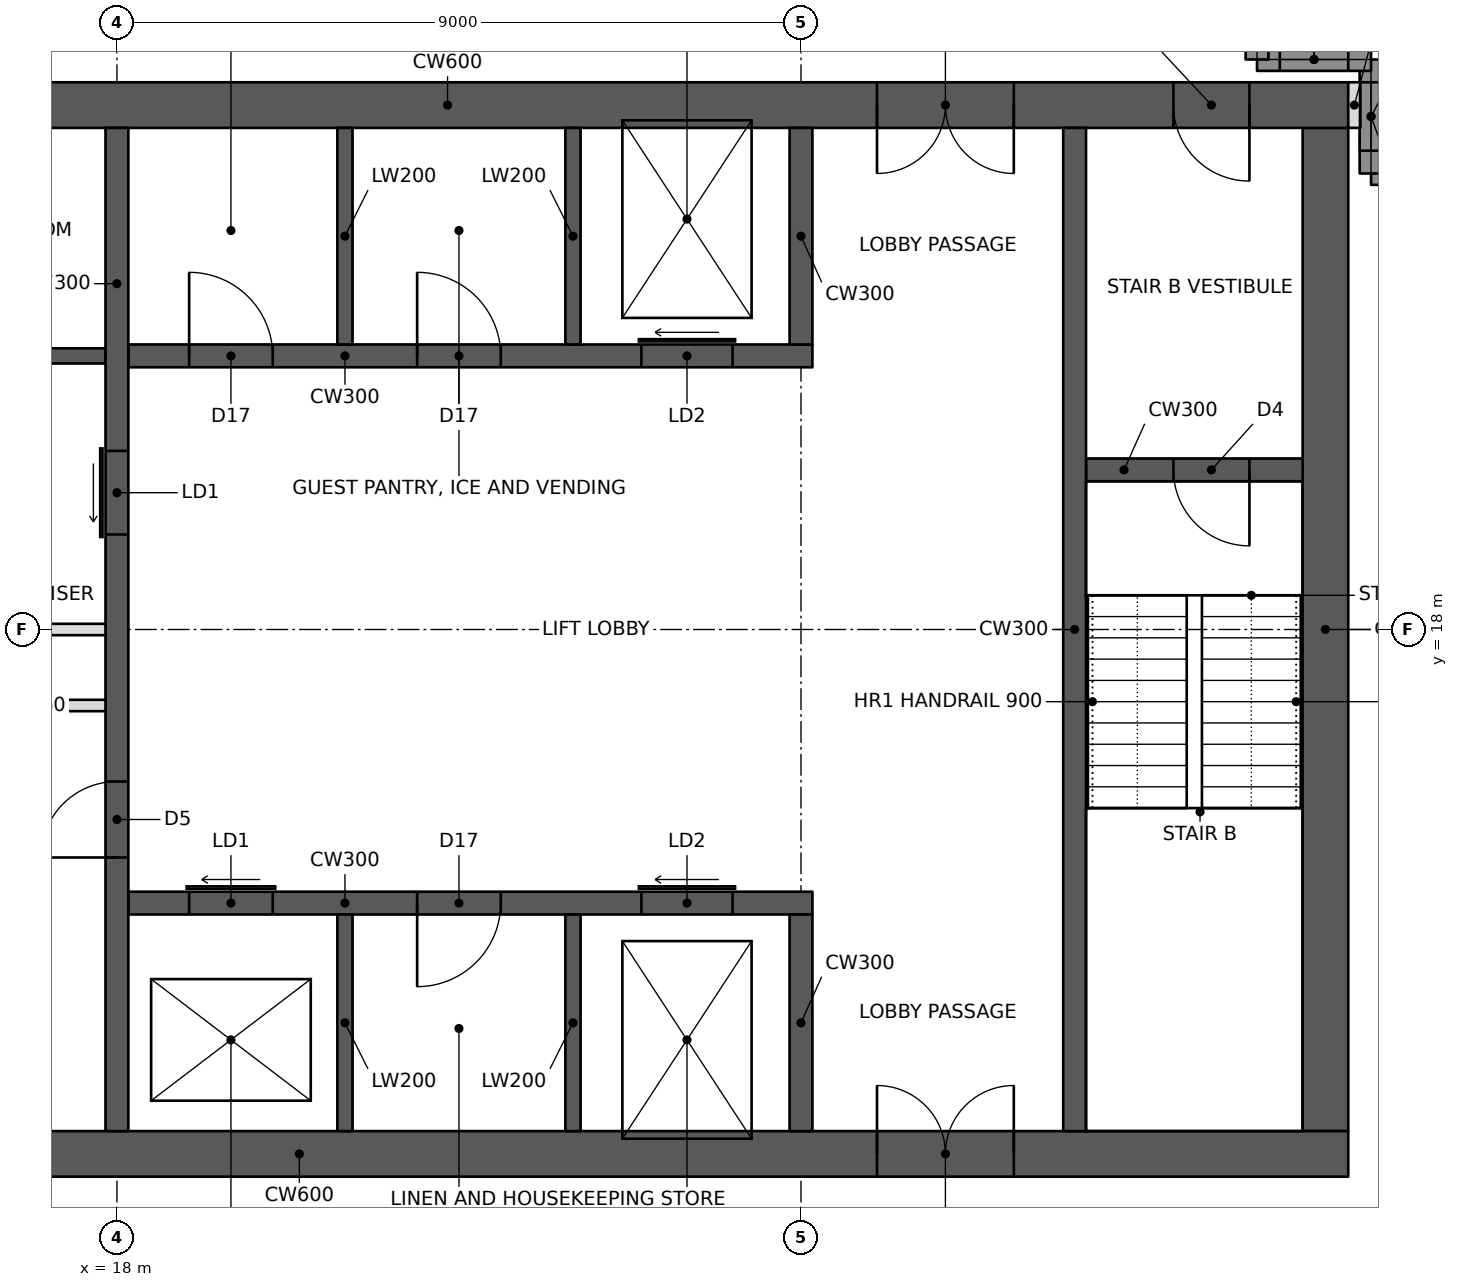
"""IFC4 building model, lengths in metres.
Left out: names, types, materials, properties, quantities, classifications, styles, units other than length and angle.
Written with IfcOpenShell. Run it as: python <this file> out.ifc"""

import sys

from ifc_helpers import new_model, si_unit, direction, frame, frame_2d, origin, place, context, subcontext, project, spatial, rectangle, extrude, element, fill, save


model = new_model("IFC4")
c1 = context("Model", 3, precision=1e-05, world=origin(), true_north=direction((0.0, 1.0)))
c2 = subcontext(c1, "Body", "Model", "MODEL_VIEW")
j1 = project(units=[si_unit("LENGTHUNIT", "METRE"), si_unit("PLANEANGLEUNIT", "RADIAN")], contexts=[c1])
p1 = place(None, origin())
s1 = spatial("IfcSite", under=j1, at=p1, CompositionType="ELEMENT")
p2 = place(p1, origin())
s2 = spatial("IfcBuilding", under=s1, at=p2, CompositionType="ELEMENT")
p3 = place(p2, frame((0.0, 0.0, 251.8)))
s3 = spatial("IfcBuildingStorey", under=s2, at=p3, CompositionType="ELEMENT", Elevation=251.8)
p4 = place(p3, frame((10.8, 11.1, 0.0), z_axis=(0.0, 0.0, 1.0), x_axis=(1.0, 0.0, 0.0)))
e1 = element("IfcWall", 1, at=p4, inside=s3, PredefinedType="SHEAR", context=c2, shape_type="SweptSolid", body=[
    extrude(rectangle(XDim=23.4, YDim=0.6, at=frame_2d((11.7, 0.0))), origin(), (0.0, 0.0, 1.0), 3.6),
])
p5 = place(p4, frame((1.0, 0.0, 0.0)))
e2 = element("IfcOpeningElement", 2, at=p5, cuts=e1, PredefinedType="OPENING", context=c2, shape_type="SweptSolid", body=[
    extrude(rectangle(XDim=1.0, YDim=2.1, at=frame_2d((0.5, 1.05))), frame((0.0, 0.31, 0.0), z_axis=(0.0, -1.0, 0.0), x_axis=(1.0, 0.0, 0.0)), (0.0, 0.0, 1.0), 0.62),
])
p6 = place(p4, frame((17.2, 0.0, 0.0)))
e3 = element("IfcOpeningElement", 3, at=p6, cuts=e1, PredefinedType="OPENING", context=c2, shape_type="SweptSolid", body=[
    extrude(rectangle(XDim=1.8, YDim=2.1, at=frame_2d((0.9, 1.05))), frame((0.0, 0.31, 0.0), z_axis=(0.0, -1.0, 0.0), x_axis=(1.0, 0.0, 0.0)), (0.0, 0.0, 1.0), 0.62),
])
p7 = place(p3, frame((10.8, 24.9, 0.0), z_axis=(0.0, 0.0, 1.0), x_axis=(1.0, 0.0, 0.0)))
e4 = element("IfcWall", 4, at=p7, inside=s3, PredefinedType="SHEAR", context=c2, shape_type="SweptSolid", body=[
    extrude(rectangle(XDim=23.4, YDim=0.6, at=frame_2d((11.7, 0.0))), origin(), (0.0, 0.0, 1.0), 3.6),
])
p8 = place(p7, frame((17.2, 0.0, 0.0)))
e5 = element("IfcOpeningElement", 5, at=p8, cuts=e4, PredefinedType="OPENING", context=c2, shape_type="SweptSolid", body=[
    extrude(rectangle(XDim=1.8, YDim=2.1, at=frame_2d((0.9, 1.05))), frame((0.0, 0.31, 0.0), z_axis=(0.0, -1.0, 0.0), x_axis=(1.0, 0.0, 0.0)), (0.0, 0.0, 1.0), 0.62),
])
p9 = place(p7, frame((21.1, 0.0, 0.0)))
e6 = element("IfcOpeningElement", 6, at=p9, cuts=e4, PredefinedType="OPENING", context=c2, shape_type="SweptSolid", body=[
    extrude(rectangle(XDim=1.0, YDim=2.1, at=frame_2d((0.5, 1.05))), frame((0.0, 0.31, 0.0), z_axis=(0.0, -1.0, 0.0), x_axis=(1.0, 0.0, 0.0)), (0.0, 0.0, 1.0), 0.62),
])
p10 = place(p7, frame((4.9, 0.0, 0.0)))
e7 = element("IfcOpeningElement", 7, at=p10, cuts=e4, PredefinedType="OPENING", context=c2, shape_type="SweptSolid", body=[
    extrude(rectangle(XDim=1.0, YDim=2.1, at=frame_2d((0.5, 1.05))), frame((0.0, 0.31, 0.0), z_axis=(0.0, -1.0, 0.0), x_axis=(1.0, 0.0, 0.0)), (0.0, 0.0, 1.0), 0.62),
])
p11 = place(p3, frame((33.9, 11.4, 0.0), z_axis=(0.0, 0.0, 1.0), x_axis=(0.0, 1.0, 0.0)))
e8 = element("IfcWall", 8, at=p11, inside=s3, PredefinedType="SHEAR", context=c2, shape_type="SweptSolid", body=[
    extrude(rectangle(XDim=13.2, YDim=0.6, at=frame_2d((6.6, 0.0))), origin(), (0.0, 0.0, 1.0), 3.6),
])
p12 = place(p3, frame((18.0, 11.4, 0.0), z_axis=(0.0, 0.0, 1.0), x_axis=(0.0, 1.0, 0.0)))
e9 = element("IfcWall", 9, at=p12, inside=s3, PredefinedType="SHEAR", context=c2, shape_type="SweptSolid", body=[
    extrude(rectangle(XDim=13.2, YDim=0.3, at=frame_2d((6.6, 0.0))), origin(), (0.0, 0.0, 1.0), 3.6),
])
p13 = place(p12, frame((3.6, 0.0, 0.0)))
e10 = element("IfcOpeningElement", 10, at=p13, cuts=e9, PredefinedType="OPENING", context=c2, shape_type="SweptSolid", body=[
    extrude(rectangle(XDim=1.0, YDim=2.1, at=frame_2d((0.5, 1.05))), frame((0.0, 0.16, 0.0), z_axis=(0.0, -1.0, 0.0), x_axis=(1.0, 0.0, 0.0)), (0.0, 0.0, 1.0), 0.32),
])
p14 = place(p12, frame((7.85, 0.0, 0.0)))
e11 = element("IfcOpeningElement", 11, at=p14, cuts=e9, PredefinedType="OPENING", context=c2, shape_type="SweptSolid", body=[
    extrude(rectangle(XDim=1.1, YDim=2.1, at=frame_2d((0.55, 1.05))), frame((0.0, 0.16, 0.0), z_axis=(0.0, -1.0, 0.0), x_axis=(1.0, 0.0, 0.0)), (0.0, 0.0, 1.0), 0.32),
])
p15 = place(p3, frame((14.55, 18.0, 0.0), z_axis=(0.0, 0.0, 1.0), x_axis=(1.0, 0.0, 0.0)))
e12 = element("IfcWall", 12, at=p15, inside=s3, PredefinedType="PARTITIONING", context=c2, shape_type="SweptSolid", body=[
    extrude(rectangle(XDim=3.3, YDim=0.15, at=frame_2d((1.65, 0.0))), origin(), (0.0, 0.0, 1.0), 3.4),
])
p16 = place(p3, frame((18.15, 14.4, 0.0), z_axis=(0.0, 0.0, 1.0), x_axis=(1.0, 0.0, 0.0)))
e13 = element("IfcWall", 13, at=p16, inside=s3, PredefinedType="SHEAR", context=c2, shape_type="SweptSolid", body=[
    extrude(rectangle(XDim=9.0, YDim=0.3, at=frame_2d((4.5, 0.0))), origin(), (0.0, 0.0, 1.0), 3.6),
])
p17 = place(p16, frame((0.8, 0.0, 0.0)))
e14 = element("IfcOpeningElement", 14, at=p17, cuts=e13, PredefinedType="OPENING", context=c2, shape_type="SweptSolid", body=[
    extrude(rectangle(XDim=1.1, YDim=2.1, at=frame_2d((0.55, 1.05))), frame((0.0, 0.16, 0.0), z_axis=(0.0, -1.0, 0.0), x_axis=(1.0, 0.0, 0.0)), (0.0, 0.0, 1.0), 0.32),
])
p18 = place(p16, frame((6.75, 0.0, 0.0)))
e15 = element("IfcOpeningElement", 15, at=p18, cuts=e13, PredefinedType="OPENING", context=c2, shape_type="SweptSolid", body=[
    extrude(rectangle(XDim=1.2, YDim=2.1, at=frame_2d((0.6, 1.05))), frame((0.0, 0.16, 0.0), z_axis=(0.0, -1.0, 0.0), x_axis=(1.0, 0.0, 0.0)), (0.0, 0.0, 1.0), 0.32),
])
p19 = place(p16, frame((3.8, 0.0, 0.0)))
e16 = element("IfcOpeningElement", 16, at=p19, cuts=e13, PredefinedType="OPENING", context=c2, shape_type="SweptSolid", body=[
    extrude(rectangle(XDim=1.1, YDim=2.1, at=frame_2d((0.55, 1.05))), frame((0.0, 0.16, 0.0), z_axis=(0.0, -1.0, 0.0), x_axis=(1.0, 0.0, 0.0)), (0.0, 0.0, 1.0), 0.32),
])
p20 = place(p3, frame((27.0, 11.4, 0.0), z_axis=(0.0, 0.0, 1.0), x_axis=(0.0, 1.0, 0.0)))
e17 = element("IfcWall", 17, at=p20, inside=s3, PredefinedType="SHEAR", context=c2, shape_type="SweptSolid", body=[
    extrude(rectangle(XDim=2.85, YDim=0.3, at=frame_2d((1.425, 0.0))), origin(), (0.0, 0.0, 1.0), 3.6),
])
for number, where, z_axis, x_axis in (
    (18, (21.0, 11.4, 0.0), (0.0, 0.0, 1.0), (0.0, 1.0, 0.0)),
    (19, (24.0, 11.4, 0.0), (0.0, 0.0, 1.0), (0.0, 1.0, 0.0)),
):
    element("IfcWall", number, at=place(p3, frame(where, z_axis=z_axis, x_axis=x_axis)), inside=s3, PredefinedType="SHEAR", context=c2, shape_type="SweptSolid", body=[
        extrude(rectangle(XDim=2.85, YDim=0.2, at=frame_2d((1.425, 0.0))), origin(), (0.0, 0.0, 1.0), 3.6),
    ])
p21 = place(p3, frame((18.15, 21.6, 0.0), z_axis=(0.0, 0.0, 1.0), x_axis=(1.0, 0.0, 0.0)))
e20 = element("IfcWall", 20, at=p21, inside=s3, PredefinedType="SHEAR", context=c2, shape_type="SweptSolid", body=[
    extrude(rectangle(XDim=9.0, YDim=0.3, at=frame_2d((4.5, 0.0))), origin(), (0.0, 0.0, 1.0), 3.6),
])
p22 = place(p21, frame((6.75, 0.0, 0.0)))
e21 = element("IfcOpeningElement", 21, at=p22, cuts=e20, PredefinedType="OPENING", context=c2, shape_type="SweptSolid", body=[
    extrude(rectangle(XDim=1.2, YDim=2.1, at=frame_2d((0.6, 1.05))), frame((0.0, 0.16, 0.0), z_axis=(0.0, -1.0, 0.0), x_axis=(1.0, 0.0, 0.0)), (0.0, 0.0, 1.0), 0.32),
])
p23 = place(p21, frame((0.8, 0.0, 0.0)))
e22 = element("IfcOpeningElement", 22, at=p23, cuts=e20, PredefinedType="OPENING", context=c2, shape_type="SweptSolid", body=[
    extrude(rectangle(XDim=1.1, YDim=2.1, at=frame_2d((0.55, 1.05))), frame((0.0, 0.16, 0.0), z_axis=(0.0, -1.0, 0.0), x_axis=(1.0, 0.0, 0.0)), (0.0, 0.0, 1.0), 0.32),
])
p24 = place(p21, frame((3.8, 0.0, 0.0)))
e23 = element("IfcOpeningElement", 23, at=p24, cuts=e20, PredefinedType="OPENING", context=c2, shape_type="SweptSolid", body=[
    extrude(rectangle(XDim=1.1, YDim=2.1, at=frame_2d((0.55, 1.05))), frame((0.0, 0.16, 0.0), z_axis=(0.0, -1.0, 0.0), x_axis=(1.0, 0.0, 0.0)), (0.0, 0.0, 1.0), 0.32),
])
p25 = place(p3, frame((27.0, 21.75, 0.0), z_axis=(0.0, 0.0, 1.0), x_axis=(0.0, 1.0, 0.0)))
e24 = element("IfcWall", 24, at=p25, inside=s3, PredefinedType="SHEAR", context=c2, shape_type="SweptSolid", body=[
    extrude(rectangle(XDim=2.85, YDim=0.3, at=frame_2d((1.425, 0.0))), origin(), (0.0, 0.0, 1.0), 3.6),
])
for number, where, z_axis, x_axis in (
    (25, (21.0, 21.75, 0.0), (0.0, 0.0, 1.0), (0.0, 1.0, 0.0)),
    (26, (24.0, 21.75, 0.0), (0.0, 0.0, 1.0), (0.0, 1.0, 0.0)),
):
    element("IfcWall", number, at=place(p3, frame(where, z_axis=z_axis, x_axis=x_axis)), inside=s3, PredefinedType="SHEAR", context=c2, shape_type="SweptSolid", body=[
        extrude(rectangle(XDim=2.85, YDim=0.2, at=frame_2d((1.425, 0.0))), origin(), (0.0, 0.0, 1.0), 3.6),
    ])
p26 = place(p3, frame((30.6, 11.4, 0.0), z_axis=(0.0, 0.0, 1.0), x_axis=(0.0, 1.0, 0.0)))
e27 = element("IfcWall", 27, at=p26, inside=s3, PredefinedType="SHEAR", context=c2, shape_type="SweptSolid", body=[
    extrude(rectangle(XDim=13.2, YDim=0.3, at=frame_2d((6.6, 0.0))), origin(), (0.0, 0.0, 1.0), 3.6),
])
p27 = place(p3, frame((30.75, 20.1, 0.0), z_axis=(0.0, 0.0, 1.0), x_axis=(1.0, 0.0, 0.0)))
e28 = element("IfcWall", 28, at=p27, inside=s3, PredefinedType="SHEAR", context=c2, shape_type="SweptSolid", body=[
    extrude(rectangle(XDim=2.85, YDim=0.3, at=frame_2d((1.425, 0.0))), origin(), (0.0, 0.0, 1.0), 3.6),
])
p28 = place(p27, frame((1.15, 0.0, 0.0)))
e29 = element("IfcOpeningElement", 29, at=p28, cuts=e28, PredefinedType="OPENING", context=c2, shape_type="SweptSolid", body=[
    extrude(rectangle(XDim=1.0, YDim=2.1, at=frame_2d((0.5, 1.05))), frame((0.0, 0.16, 0.0), z_axis=(0.0, -1.0, 0.0), x_axis=(1.0, 0.0, 0.0)), (0.0, 0.0, 1.0), 0.32),
])
p29 = place(p3, frame((14.55, 21.6, 0.0), z_axis=(0.0, 0.0, 1.0), x_axis=(1.0, 0.0, 0.0)))
e30 = element("IfcWall", 30, at=p29, inside=s3, PredefinedType="SHEAR", context=c2, shape_type="SweptSolid", body=[
    extrude(rectangle(XDim=3.3, YDim=0.2, at=frame_2d((1.65, 0.0))), origin(), (0.0, 0.0, 1.0), 3.6),
])
p30 = place(p3, frame((36.0, 24.0, 0.0), z_axis=(0.0, 0.0, 1.0), x_axis=(-1.0, 0.0, 0.0)))
e31 = element("IfcWall", 31, at=p30, inside=s3, PredefinedType="SOLIDWALL", context=c2, shape_type="SweptSolid", body=[
    extrude(rectangle(XDim=1.5, YDim=0.3, at=frame_2d((0.75, 0.0))), origin(), (0.0, 0.0, 1.0), 2.62),
])
p31 = place(p3, frame((34.5, 24.0, 0.0), z_axis=(0.0, 0.0, 1.0), x_axis=(0.0, 1.0, 0.0)))
e32 = element("IfcWall", 32, at=p31, inside=s3, PredefinedType="SOLIDWALL", context=c2, shape_type="SweptSolid", body=[
    extrude(rectangle(XDim=1.5, YDim=0.3, at=frame_2d((0.75, 0.0))), origin(), (0.0, 0.0, 1.0), 3.4),
])
p32 = place(p31, frame((0.3, 0.0, 0.6)))
e33 = element("IfcOpeningElement", 33, at=p32, cuts=e32, PredefinedType="OPENING", context=c2, shape_type="SweptSolid", body=[
    extrude(rectangle(XDim=0.9, YDim=2.2, at=frame_2d((0.45, 1.1))), frame((0.0, 0.16, 0.0), z_axis=(0.0, -1.0, 0.0), x_axis=(1.0, 0.0, 0.0)), (0.0, 0.0, 1.0), 0.32),
])
p33 = place(p3, frame((34.5, 25.5, 0.0), z_axis=(0.0, 0.0, 1.0), x_axis=(-1.0, 0.0, 0.0)))
e34 = element("IfcWall", 34, at=p33, inside=s3, PredefinedType="SOLIDWALL", context=c2, shape_type="SweptSolid", body=[
    extrude(rectangle(XDim=1.5, YDim=0.3, at=frame_2d((0.75, 0.0))), origin(), (0.0, 0.0, 1.0), 3.4),
])
p34 = place(p33, frame((0.3, 0.0, 0.6)))
e35 = element("IfcOpeningElement", 35, at=p34, cuts=e34, PredefinedType="OPENING", context=c2, shape_type="SweptSolid", body=[
    extrude(rectangle(XDim=0.9, YDim=2.2, at=frame_2d((0.45, 1.1))), frame((0.0, 0.16, 0.0), z_axis=(0.0, -1.0, 0.0), x_axis=(1.0, 0.0, 0.0)), (0.0, 0.0, 1.0), 0.32),
])
p35 = place(p3, frame((33.0, 25.5, 0.0), z_axis=(0.0, 0.0, 1.0), x_axis=(0.0, 1.0, 0.0)))
e36 = element("IfcWall", 36, at=p35, inside=s3, PredefinedType="SOLIDWALL", context=c2, shape_type="SweptSolid", body=[
    extrude(rectangle(XDim=1.5, YDim=0.3, at=frame_2d((0.75, 0.0))), origin(), (0.0, 0.0, 1.0), 2.62),
])
p36 = place(p3, frame((34.2, 24.9, 0.0), z_axis=(0.0, 0.0, 1.0), x_axis=(1.0, 0.0, 0.0)))
e37 = element("IfcWall", 37, at=p36, inside=s3, PredefinedType="PARTITIONING", context=c2, shape_type="SweptSolid", body=[
    extrude(rectangle(XDim=0.16, YDim=0.6, at=frame_2d((0.08, 0.0))), origin(), (0.0, 0.0, 1.0), 3.4),
])
p37 = place(p3, frame((14.55, 17.0, 0.0), z_axis=(0.0, 0.0, 1.0), x_axis=(1.0, 0.0, 0.0)))
e38 = element("IfcWall", 38, at=p37, inside=s3, PredefinedType="PARTITIONING", context=c2, shape_type="SweptSolid", body=[
    extrude(rectangle(XDim=3.3, YDim=0.15, at=frame_2d((1.65, 0.0))), origin(), (0.0, 0.0, 1.0), 3.4),
])
p38 = place(p37, frame((0.3, 0.0, 0.0)))
e39 = element("IfcOpeningElement", 39, at=p38, cuts=e38, PredefinedType="OPENING", context=c2, shape_type="SweptSolid", body=[
    extrude(rectangle(XDim=1.0, YDim=2.1, at=frame_2d((0.5, 1.05))), frame((0.0, 0.085, 0.0), z_axis=(0.0, -1.0, 0.0), x_axis=(1.0, 0.0, 0.0)), (0.0, 0.0, 1.0), 0.17),
])
p39 = place(p32, origin())
e40 = element("IfcWindow", 40, at=p39, inside=s3, PartitioningType="SINGLE_PANEL", PredefinedType="WINDOW", context=c2, shape_type="SweptSolid", body=[
    extrude(rectangle(XDim=0.9, YDim=2.2, at=frame_2d((0.45, 1.1))), frame((0.0, 0.03, 0.0), z_axis=(0.0, -1.0, 0.0), x_axis=(1.0, 0.0, 0.0)), (0.0, 0.0, 1.0), 0.06),
])
fill(e33, e40)
p40 = place(p34, origin())
e41 = element("IfcWindow", 41, at=p40, inside=s3, PartitioningType="SINGLE_PANEL", PredefinedType="WINDOW", context=c2, shape_type="SweptSolid", body=[
    extrude(rectangle(XDim=0.9, YDim=2.2, at=frame_2d((0.45, 1.1))), frame((0.0, 0.03, 0.0), z_axis=(0.0, -1.0, 0.0), x_axis=(1.0, 0.0, 0.0)), (0.0, 0.0, 1.0), 0.06),
])
fill(e35, e41)
p41 = place(p6, origin())
e42 = element("IfcDoor", 42, at=p41, inside=s3, OperationType="DOUBLE_DOOR_SINGLE_SWING", PredefinedType="DOOR", context=c2, shape_type="SweptSolid", body=[
    extrude(rectangle(XDim=1.8, YDim=2.1, at=frame_2d((0.9, 1.05))), frame((0.0, 0.025, 0.0), z_axis=(0.0, -1.0, 0.0), x_axis=(1.0, 0.0, 0.0)), (0.0, 0.0, 1.0), 0.05),
])
fill(e3, e42)
p42 = place(p8, frame((1.8, 0.0, 0.0), z_axis=(0.0, 0.0, 1.0), x_axis=(-1.0, 0.0, 0.0)))
e43 = element("IfcDoor", 43, at=p42, inside=s3, OperationType="DOUBLE_DOOR_SINGLE_SWING", PredefinedType="DOOR", context=c2, shape_type="SweptSolid", body=[
    extrude(rectangle(XDim=1.8, YDim=2.1, at=frame_2d((0.9, 1.05))), frame((0.0, 0.025, 0.0), z_axis=(0.0, -1.0, 0.0), x_axis=(1.0, 0.0, 0.0)), (0.0, 0.0, 1.0), 0.05),
])
fill(e5, e43)
p43 = place(p9, frame((1.0, 0.0, 0.0), z_axis=(0.0, 0.0, 1.0), x_axis=(-1.0, 0.0, 0.0)))
e44 = element("IfcDoor", 44, at=p43, inside=s3, OperationType="SINGLE_SWING_LEFT", PredefinedType="DOOR", context=c2, shape_type="SweptSolid", body=[
    extrude(rectangle(XDim=1.0, YDim=2.1, at=frame_2d((0.5, 1.05))), frame((0.0, 0.025, 0.0), z_axis=(0.0, -1.0, 0.0), x_axis=(1.0, 0.0, 0.0)), (0.0, 0.0, 1.0), 0.05),
])
fill(e6, e44)
p44 = place(p28, frame((1.0, 0.0, 0.0), z_axis=(0.0, 0.0, 1.0), x_axis=(-1.0, 0.0, 0.0)))
e45 = element("IfcDoor", 45, at=p44, inside=s3, OperationType="SINGLE_SWING_LEFT", PredefinedType="DOOR", context=c2, shape_type="SweptSolid", body=[
    extrude(rectangle(XDim=1.0, YDim=2.1, at=frame_2d((0.5, 1.05))), frame((0.0, 0.025, 0.0), z_axis=(0.0, -1.0, 0.0), x_axis=(1.0, 0.0, 0.0)), (0.0, 0.0, 1.0), 0.05),
])
fill(e29, e45)
p45 = place(p13, origin())
e46 = element("IfcDoor", 46, at=p45, inside=s3, OperationType="SINGLE_SWING_LEFT", PredefinedType="DOOR", context=c2, shape_type="SweptSolid", body=[
    extrude(rectangle(XDim=1.0, YDim=2.1, at=frame_2d((0.5, 1.05))), frame((0.0, 0.025, 0.0), z_axis=(0.0, -1.0, 0.0), x_axis=(1.0, 0.0, 0.0)), (0.0, 0.0, 1.0), 0.05),
])
fill(e10, e46)
p46 = place(p17, origin())
e47 = element("IfcDoor", 47, at=p46, inside=s3, OperationType="SLIDING_TO_LEFT", PredefinedType="DOOR", context=c2, shape_type="SweptSolid", body=[
    extrude(rectangle(XDim=1.1, YDim=2.1, at=frame_2d((0.55, 1.05))), frame((0.0, 0.025, 0.0), z_axis=(0.0, -1.0, 0.0), x_axis=(1.0, 0.0, 0.0)), (0.0, 0.0, 1.0), 0.05),
])
fill(e14, e47)
p47 = place(p14, origin())
e48 = element("IfcDoor", 48, at=p47, inside=s3, OperationType="SLIDING_TO_LEFT", PredefinedType="DOOR", context=c2, shape_type="SweptSolid", body=[
    extrude(rectangle(XDim=1.1, YDim=2.1, at=frame_2d((0.55, 1.05))), frame((0.0, 0.025, 0.0), z_axis=(0.0, -1.0, 0.0), x_axis=(1.0, 0.0, 0.0)), (0.0, 0.0, 1.0), 0.05),
])
fill(e11, e48)
p48 = place(p18, origin())
e49 = element("IfcDoor", 49, at=p48, inside=s3, OperationType="SLIDING_TO_LEFT", PredefinedType="DOOR", context=c2, shape_type="SweptSolid", body=[
    extrude(rectangle(XDim=1.2, YDim=2.1, at=frame_2d((0.6, 1.05))), frame((0.0, 0.025, 0.0), z_axis=(0.0, -1.0, 0.0), x_axis=(1.0, 0.0, 0.0)), (0.0, 0.0, 1.0), 0.05),
])
fill(e15, e49)
p49 = place(p22, origin())
e50 = element("IfcDoor", 50, at=p49, inside=s3, OperationType="SLIDING_TO_LEFT", PredefinedType="DOOR", context=c2, shape_type="SweptSolid", body=[
    extrude(rectangle(XDim=1.2, YDim=2.1, at=frame_2d((0.6, 1.05))), frame((0.0, 0.025, 0.0), z_axis=(0.0, -1.0, 0.0), x_axis=(1.0, 0.0, 0.0)), (0.0, 0.0, 1.0), 0.05),
])
fill(e21, e50)
p50 = place(p23, origin())
e51 = element("IfcDoor", 51, at=p50, inside=s3, OperationType="SINGLE_SWING_LEFT", PredefinedType="DOOR", context=c2, shape_type="SweptSolid", body=[
    extrude(rectangle(XDim=1.1, YDim=2.1, at=frame_2d((0.55, 1.05))), frame((0.0, 0.025, 0.0), z_axis=(0.0, -1.0, 0.0), x_axis=(1.0, 0.0, 0.0)), (0.0, 0.0, 1.0), 0.05),
])
fill(e22, e51)
p51 = place(p24, origin())
e52 = element("IfcDoor", 52, at=p51, inside=s3, OperationType="SINGLE_SWING_LEFT", PredefinedType="DOOR", context=c2, shape_type="SweptSolid", body=[
    extrude(rectangle(XDim=1.1, YDim=2.1, at=frame_2d((0.55, 1.05))), frame((0.0, 0.025, 0.0), z_axis=(0.0, -1.0, 0.0), x_axis=(1.0, 0.0, 0.0)), (0.0, 0.0, 1.0), 0.05),
])
fill(e23, e52)
p52 = place(p19, frame((1.1, 0.0, 0.0), z_axis=(0.0, 0.0, 1.0), x_axis=(-1.0, 0.0, 0.0)))
e53 = element("IfcDoor", 53, at=p52, inside=s3, OperationType="SINGLE_SWING_RIGHT", PredefinedType="DOOR", context=c2, shape_type="SweptSolid", body=[
    extrude(rectangle(XDim=1.1, YDim=2.1, at=frame_2d((0.55, 1.05))), frame((0.0, 0.025, 0.0), z_axis=(0.0, -1.0, 0.0), x_axis=(1.0, 0.0, 0.0)), (0.0, 0.0, 1.0), 0.05),
])
fill(e16, e53)
save(model, sys.argv[1])
